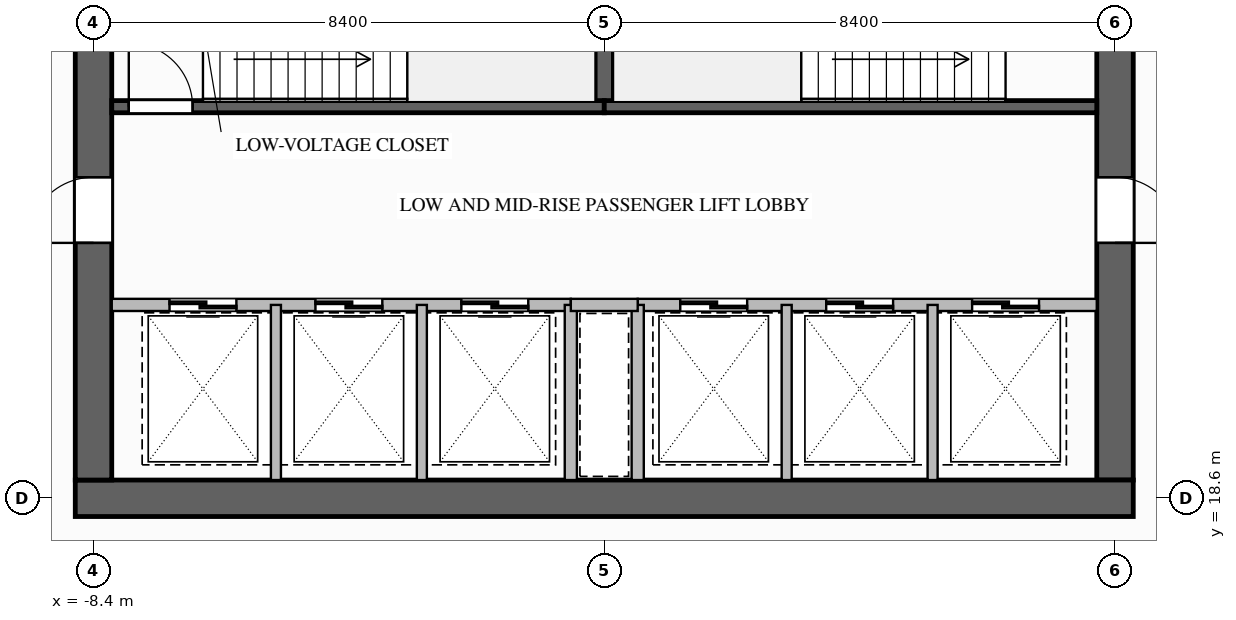
"""IFC4 building model, lengths in metres.
Left out: names, types, materials, properties, quantities, classifications, styles, units other than length and angle.
Written with IfcOpenShell. Run it as: python <this file> out.ifc"""

import sys

from ifc_helpers import new_model, si_unit, direction, frame, frame_2d, origin, place, context, subcontext, project, spatial, rectangle, extrude, element, fill, save


model = new_model("IFC4")
c1 = context("Model", 3, precision=1e-05, world=origin(), true_north=direction((0.0, 1.0)))
c2 = subcontext(c1, "Body", "Model", "MODEL_VIEW")
j1 = project(units=[si_unit("LENGTHUNIT", "METRE"), si_unit("PLANEANGLEUNIT", "RADIAN")], contexts=[c1])
p1 = place(None, origin())
s1 = spatial("IfcSite", under=j1, at=p1, CompositionType="ELEMENT")
p2 = place(p1, origin())
s2 = spatial("IfcBuilding", under=s1, at=p2, CompositionType="ELEMENT")
p3 = place(p2, frame((0.0, 0.0, 87.2)))
s3 = spatial("IfcBuildingStorey", under=s2, at=p3, CompositionType="ELEMENT", Elevation=87.2)
p4 = place(p3, frame((8.4, 35.1, 0.0), z_axis=(0.0, 0.0, 1.0), x_axis=(0.0, -1.0, 0.0)))
e1 = element("IfcWall", 1, at=p4, inside=s3, PredefinedType="SHEAR", context=c2, shape_type="SweptSolid", body=[
    extrude(rectangle(XDim=16.2, YDim=0.6, at=frame_2d((8.1, 0.0))), origin(), (0.0, 0.0, 1.0), 4.6),
])
p5 = place(p4, frame((3.08, 0.0, 0.0)))
e2 = element("IfcOpeningElement", 2, at=p5, cuts=e1, PredefinedType="OPENING", context=c2, shape_type="SweptSolid", body=[
    extrude(rectangle(XDim=1.12, YDim=2.1, at=frame_2d((0.56, 1.05))), frame((0.0, 0.31, 0.0), z_axis=(0.0, -1.0, 0.0), x_axis=(1.0, 0.0, 0.0)), (0.0, 0.0, 1.0), 0.62),
])
p6 = place(p4, frame((11.22, 0.0, 0.0)))
e3 = element("IfcOpeningElement", 3, at=p6, cuts=e1, PredefinedType="OPENING", context=c2, shape_type="SweptSolid", body=[
    extrude(rectangle(XDim=1.08, YDim=2.04, at=frame_2d((0.54, 1.02))), frame((0.0, 0.31, 0.0), z_axis=(0.0, -1.0, 0.0), x_axis=(1.0, 0.0, 0.0)), (0.0, 0.0, 1.0), 0.62),
])
p7 = place(p3, frame((8.7, 18.6, 0.0), z_axis=(0.0, 0.0, 1.0), x_axis=(-1.0, 0.0, 0.0)))
e4 = element("IfcWall", 4, at=p7, inside=s3, PredefinedType="SHEAR", context=c2, shape_type="SweptSolid", body=[
    extrude(rectangle(XDim=17.4, YDim=0.6, at=frame_2d((8.7, 0.0))), origin(), (0.0, 0.0, 1.0), 4.6),
])
p8 = place(p3, frame((-8.4, 18.9, 0.0), z_axis=(0.0, 0.0, 1.0), x_axis=(0.0, 1.0, 0.0)))
e5 = element("IfcWall", 5, at=p8, inside=s3, PredefinedType="SHEAR", context=c2, shape_type="SweptSolid", body=[
    extrude(rectangle(XDim=16.2, YDim=0.6, at=frame_2d((8.1, 0.0))), origin(), (0.0, 0.0, 1.0), 4.6),
])
p9 = place(p8, frame((12.02, 0.0, 0.0)))
e6 = element("IfcOpeningElement", 6, at=p9, cuts=e5, PredefinedType="OPENING", context=c2, shape_type="SweptSolid", body=[
    extrude(rectangle(XDim=1.08, YDim=2.04, at=frame_2d((0.54, 1.02))), frame((0.0, 0.31, 0.0), z_axis=(0.0, -1.0, 0.0), x_axis=(1.0, 0.0, 0.0)), (0.0, 0.0, 1.0), 0.62),
])
p10 = place(p8, frame((3.9, 0.0, 0.0)))
e7 = element("IfcOpeningElement", 7, at=p10, cuts=e5, PredefinedType="OPENING", context=c2, shape_type="SweptSolid", body=[
    extrude(rectangle(XDim=1.08, YDim=2.04, at=frame_2d((0.54, 1.02))), frame((0.0, 0.31, 0.0), z_axis=(0.0, -1.0, 0.0), x_axis=(1.0, 0.0, 0.0)), (0.0, 0.0, 1.0), 0.62),
])
p11 = place(p3, frame((0.0, 25.04, 0.0), z_axis=(0.0, 0.0, 1.0), x_axis=(0.0, 1.0, 0.0)))
e8 = element("IfcWall", 8, at=p11, inside=s3, PredefinedType="SOLIDWALL", context=c2, shape_type="SweptSolid", body=[
    extrude(rectangle(XDim=3.12, YDim=0.3, at=frame_2d((1.56, 0.0))), origin(), (0.0, 0.0, 1.0), 4.34),
])
p12 = place(p3, frame((-8.1, 25.04, 0.0), z_axis=(0.0, 0.0, 1.0), x_axis=(1.0, 0.0, 0.0)))
e9 = element("IfcWall", 9, at=p12, inside=s3, PredefinedType="SOLIDWALL", context=c2, shape_type="SweptSolid", body=[
    extrude(rectangle(XDim=8.1, YDim=0.2, at=frame_2d((4.05, 0.0))), origin(), (0.0, 0.0, 1.0), 4.34),
])
p13 = place(p12, frame((0.28, 0.0, 0.0)))
e10 = element("IfcOpeningElement", 10, at=p13, cuts=e9, PredefinedType="OPENING", context=c2, shape_type="SweptSolid", body=[
    extrude(rectangle(XDim=1.05, YDim=2.1, at=frame_2d((0.525, 1.05))), frame((0.0, 0.11, 0.0), z_axis=(0.0, -1.0, 0.0), x_axis=(1.0, 0.0, 0.0)), (0.0, 0.0, 1.0), 0.22),
])
p14 = place(p3, frame((0.0, 25.04, 0.0), z_axis=(0.0, 0.0, 1.0), x_axis=(1.0, 0.0, 0.0)))
e11 = element("IfcWall", 11, at=p14, inside=s3, PredefinedType="SOLIDWALL", context=c2, shape_type="SweptSolid", body=[
    extrude(rectangle(XDim=8.1, YDim=0.2, at=frame_2d((4.05, 0.0))), origin(), (0.0, 0.0, 1.0), 4.34),
])
p15 = place(p3, frame((-0.55, 21.78, 0.0), z_axis=(0.0, 0.0, 1.0), x_axis=(-1.0, 0.0, 0.0)))
e12 = element("IfcWall", 12, at=p15, inside=s3, PredefinedType="SOLIDWALL", context=c2, shape_type="SweptSolid", body=[
    extrude(rectangle(XDim=7.55, YDim=0.2, at=frame_2d((3.775, 0.0))), origin(), (0.0, 0.0, 1.0), 4.34),
])
p16 = place(p15, frame((5.5, 0.0, 0.0)))
e13 = element("IfcOpeningElement", 13, at=p16, cuts=e12, PredefinedType="OPENING", context=c2, shape_type="SweptSolid", body=[
    extrude(rectangle(XDim=1.1, YDim=2.2, at=frame_2d((0.55, 1.1))), frame((0.0, 0.11, 0.0), z_axis=(0.0, -1.0, 0.0), x_axis=(1.0, 0.0, 0.0)), (0.0, 0.0, 1.0), 0.22),
])
p17 = place(p15, frame((3.1, 0.0, 0.0)))
e14 = element("IfcOpeningElement", 14, at=p17, cuts=e12, PredefinedType="OPENING", context=c2, shape_type="SweptSolid", body=[
    extrude(rectangle(XDim=1.1, YDim=2.2, at=frame_2d((0.55, 1.1))), frame((0.0, 0.11, 0.0), z_axis=(0.0, -1.0, 0.0), x_axis=(1.0, 0.0, 0.0)), (0.0, 0.0, 1.0), 0.22),
])
p18 = place(p15, frame((0.7, 0.0, 0.0)))
e15 = element("IfcOpeningElement", 15, at=p18, cuts=e12, PredefinedType="OPENING", context=c2, shape_type="SweptSolid", body=[
    extrude(rectangle(XDim=1.1, YDim=2.2, at=frame_2d((0.55, 1.1))), frame((0.0, 0.11, 0.0), z_axis=(0.0, -1.0, 0.0), x_axis=(1.0, 0.0, 0.0)), (0.0, 0.0, 1.0), 0.22),
])
for number, where, z_axis, x_axis in (
    (16, (-5.4, 18.9, 0.0), (0.0, 0.0, 1.0), (0.0, 1.0, 0.0)),
    (17, (-3.0, 18.9, 0.0), (0.0, 0.0, 1.0), (0.0, 1.0, 0.0)),
):
    element("IfcWall", number, at=place(p3, frame(where, z_axis=z_axis, x_axis=x_axis)), inside=s3, PredefinedType="PARTITIONING", context=c2, shape_type="SweptSolid", body=[
        extrude(rectangle(XDim=2.88, YDim=0.165, at=frame_2d((1.44, 0.0))), origin(), (0.0, 0.0, 1.0), 4.34),
    ])
p19 = place(p3, frame((-0.55, 18.9, 0.0), z_axis=(0.0, 0.0, 1.0), x_axis=(0.0, 1.0, 0.0)))
e18 = element("IfcWall", 18, at=p19, inside=s3, PredefinedType="SOLIDWALL", context=c2, shape_type="SweptSolid", body=[
    extrude(rectangle(XDim=2.88, YDim=0.2, at=frame_2d((1.44, 0.0))), origin(), (0.0, 0.0, 1.0), 4.34),
])
p20 = place(p3, frame((8.1, 21.78, 0.0), z_axis=(0.0, 0.0, 1.0), x_axis=(-1.0, 0.0, 0.0)))
e19 = element("IfcWall", 19, at=p20, inside=s3, PredefinedType="SOLIDWALL", context=c2, shape_type="SweptSolid", body=[
    extrude(rectangle(XDim=7.55, YDim=0.2, at=frame_2d((3.775, 0.0))), origin(), (0.0, 0.0, 1.0), 4.34),
])
p21 = place(p20, frame((5.75, 0.0, 0.0)))
e20 = element("IfcOpeningElement", 20, at=p21, cuts=e19, PredefinedType="OPENING", context=c2, shape_type="SweptSolid", body=[
    extrude(rectangle(XDim=1.1, YDim=2.2, at=frame_2d((0.55, 1.1))), frame((0.0, 0.11, 0.0), z_axis=(0.0, -1.0, 0.0), x_axis=(1.0, 0.0, 0.0)), (0.0, 0.0, 1.0), 0.22),
])
p22 = place(p20, frame((3.35, 0.0, 0.0)))
e21 = element("IfcOpeningElement", 21, at=p22, cuts=e19, PredefinedType="OPENING", context=c2, shape_type="SweptSolid", body=[
    extrude(rectangle(XDim=1.1, YDim=2.2, at=frame_2d((0.55, 1.1))), frame((0.0, 0.11, 0.0), z_axis=(0.0, -1.0, 0.0), x_axis=(1.0, 0.0, 0.0)), (0.0, 0.0, 1.0), 0.22),
])
p23 = place(p20, frame((0.95, 0.0, 0.0)))
e22 = element("IfcOpeningElement", 22, at=p23, cuts=e19, PredefinedType="OPENING", context=c2, shape_type="SweptSolid", body=[
    extrude(rectangle(XDim=1.1, YDim=2.2, at=frame_2d((0.55, 1.1))), frame((0.0, 0.11, 0.0), z_axis=(0.0, -1.0, 0.0), x_axis=(1.0, 0.0, 0.0)), (0.0, 0.0, 1.0), 0.22),
])
p24 = place(p3, frame((0.55, 18.9, 0.0), z_axis=(0.0, 0.0, 1.0), x_axis=(0.0, 1.0, 0.0)))
e23 = element("IfcWall", 23, at=p24, inside=s3, PredefinedType="SOLIDWALL", context=c2, shape_type="SweptSolid", body=[
    extrude(rectangle(XDim=2.88, YDim=0.2, at=frame_2d((1.44, 0.0))), origin(), (0.0, 0.0, 1.0), 4.34),
])
for number, where, z_axis, x_axis in (
    (24, (3.0, 18.9, 0.0), (0.0, 0.0, 1.0), (0.0, 1.0, 0.0)),
    (25, (5.4, 18.9, 0.0), (0.0, 0.0, 1.0), (0.0, 1.0, 0.0)),
):
    element("IfcWall", number, at=place(p3, frame(where, z_axis=z_axis, x_axis=x_axis)), inside=s3, PredefinedType="PARTITIONING", context=c2, shape_type="SweptSolid", body=[
        extrude(rectangle(XDim=2.88, YDim=0.165, at=frame_2d((1.44, 0.0))), origin(), (0.0, 0.0, 1.0), 4.34),
    ])
p25 = place(p3, frame((-0.55, 21.78, 0.0), z_axis=(0.0, 0.0, 1.0), x_axis=(1.0, 0.0, 0.0)))
e26 = element("IfcWall", 26, at=p25, inside=s3, PredefinedType="SOLIDWALL", context=c2, shape_type="SweptSolid", body=[
    extrude(rectangle(XDim=1.1, YDim=0.2, at=frame_2d((0.55, 0.0))), origin(), (0.0, 0.0, 1.0), 4.34),
])
p26 = place(p13, origin())
e27 = element("IfcDoor", 27, at=p26, inside=s3, OperationType="SINGLE_SWING_LEFT", PredefinedType="DOOR", context=c2, shape_type="SweptSolid", body=[
    extrude(rectangle(XDim=1.05, YDim=2.1, at=frame_2d((0.525, 1.05))), frame((0.0, 0.025, 0.0), z_axis=(0.0, -1.0, 0.0), x_axis=(1.0, 0.0, 0.0)), (0.0, 0.0, 1.0), 0.05),
])
fill(e10, e27)
p27 = place(p16, origin())
e28 = element("IfcDoor", 28, at=p27, inside=s3, OperationType="SLIDING_TO_LEFT", PredefinedType="DOOR", context=c2, shape_type="SweptSolid", body=[
    extrude(rectangle(XDim=1.1, YDim=2.2, at=frame_2d((0.55, 1.1))), frame((0.0, 0.025, 0.0), z_axis=(0.0, -1.0, 0.0), x_axis=(1.0, 0.0, 0.0)), (0.0, 0.0, 1.0), 0.05),
])
fill(e13, e28)
p28 = place(p17, origin())
e29 = element("IfcDoor", 29, at=p28, inside=s3, OperationType="SLIDING_TO_LEFT", PredefinedType="DOOR", context=c2, shape_type="SweptSolid", body=[
    extrude(rectangle(XDim=1.1, YDim=2.2, at=frame_2d((0.55, 1.1))), frame((0.0, 0.025, 0.0), z_axis=(0.0, -1.0, 0.0), x_axis=(1.0, 0.0, 0.0)), (0.0, 0.0, 1.0), 0.05),
])
fill(e14, e29)
p29 = place(p18, origin())
e30 = element("IfcDoor", 30, at=p29, inside=s3, OperationType="SLIDING_TO_LEFT", PredefinedType="DOOR", context=c2, shape_type="SweptSolid", body=[
    extrude(rectangle(XDim=1.1, YDim=2.2, at=frame_2d((0.55, 1.1))), frame((0.0, 0.025, 0.0), z_axis=(0.0, -1.0, 0.0), x_axis=(1.0, 0.0, 0.0)), (0.0, 0.0, 1.0), 0.05),
])
fill(e15, e30)
p30 = place(p21, origin())
e31 = element("IfcDoor", 31, at=p30, inside=s3, OperationType="SLIDING_TO_LEFT", PredefinedType="DOOR", context=c2, shape_type="SweptSolid", body=[
    extrude(rectangle(XDim=1.1, YDim=2.2, at=frame_2d((0.55, 1.1))), frame((0.0, 0.025, 0.0), z_axis=(0.0, -1.0, 0.0), x_axis=(1.0, 0.0, 0.0)), (0.0, 0.0, 1.0), 0.05),
])
fill(e20, e31)
p31 = place(p22, origin())
e32 = element("IfcDoor", 32, at=p31, inside=s3, OperationType="SLIDING_TO_LEFT", PredefinedType="DOOR", context=c2, shape_type="SweptSolid", body=[
    extrude(rectangle(XDim=1.1, YDim=2.2, at=frame_2d((0.55, 1.1))), frame((0.0, 0.025, 0.0), z_axis=(0.0, -1.0, 0.0), x_axis=(1.0, 0.0, 0.0)), (0.0, 0.0, 1.0), 0.05),
])
fill(e21, e32)
p32 = place(p23, origin())
e33 = element("IfcDoor", 33, at=p32, inside=s3, OperationType="SLIDING_TO_LEFT", PredefinedType="DOOR", context=c2, shape_type="SweptSolid", body=[
    extrude(rectangle(XDim=1.1, YDim=2.2, at=frame_2d((0.55, 1.1))), frame((0.0, 0.025, 0.0), z_axis=(0.0, -1.0, 0.0), x_axis=(1.0, 0.0, 0.0)), (0.0, 0.0, 1.0), 0.05),
])
fill(e22, e33)
p33 = place(p10, origin())
e34 = element("IfcDoor", 34, at=p33, inside=s3, OperationType="SINGLE_SWING_LEFT", PredefinedType="DOOR", context=c2, shape_type="SweptSolid", body=[
    extrude(rectangle(XDim=1.08, YDim=2.04, at=frame_2d((0.54, 1.02))), frame((0.0, 0.025, 0.0), z_axis=(0.0, -1.0, 0.0), x_axis=(1.0, 0.0, 0.0)), (0.0, 0.0, 1.0), 0.05),
])
fill(e7, e34)
p34 = place(p6, origin())
e35 = element("IfcDoor", 35, at=p34, inside=s3, OperationType="SINGLE_SWING_RIGHT", PredefinedType="DOOR", context=c2, shape_type="SweptSolid", body=[
    extrude(rectangle(XDim=1.08, YDim=2.04, at=frame_2d((0.54, 1.02))), frame((0.0, 0.025, 0.0), z_axis=(0.0, -1.0, 0.0), x_axis=(1.0, 0.0, 0.0)), (0.0, 0.0, 1.0), 0.05),
])
fill(e3, e35)
save(model, sys.argv[1])
